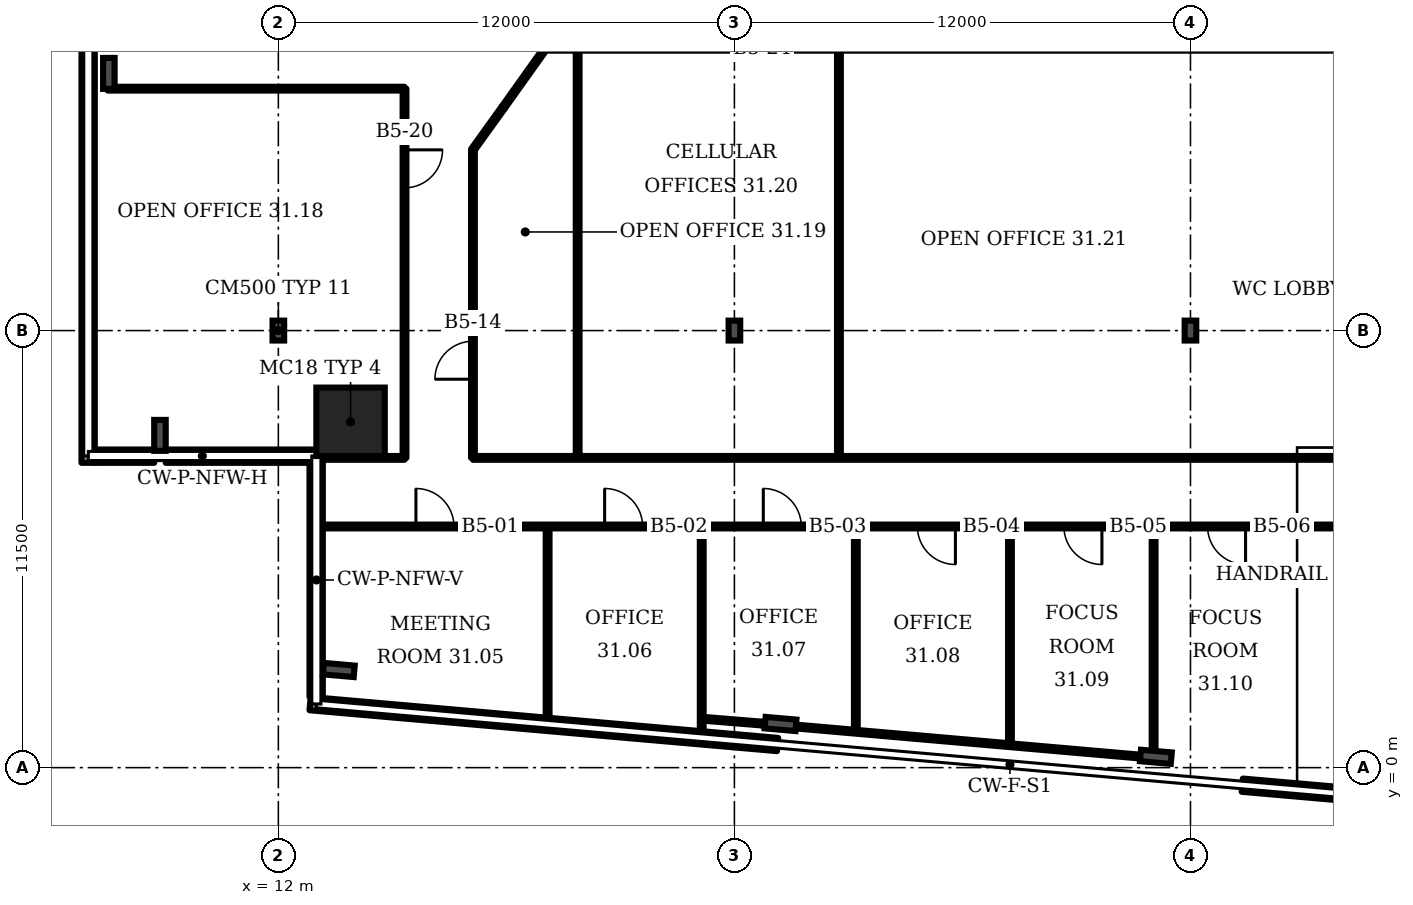
"""IFC4 building model, lengths in metres.
Left out: names, types, materials, properties, quantities, classifications, styles, units other than length and angle.
Written with IfcOpenShell. Run it as: python <this file> out.ifc"""

import sys

from ifc_helpers import new_model, si_unit, direction, frame, frame_2d, origin, origin_2d, place, context, subcontext, project, spatial, rectangle, i_section, extrude, element, fill, save


model = new_model("IFC4")
c1 = context("Model", 3, precision=1e-05, world=origin(), true_north=direction((0.0, 1.0)))
c2 = subcontext(c1, "Body", "Model", "MODEL_VIEW")
j1 = project(units=[si_unit("LENGTHUNIT", "METRE"), si_unit("PLANEANGLEUNIT", "RADIAN")], contexts=[c1])
p1 = place(None, origin())
s1 = spatial("IfcSite", under=j1, at=p1, CompositionType="ELEMENT")
p2 = place(p1, origin())
s2 = spatial("IfcBuilding", under=s1, at=p2, CompositionType="ELEMENT")
p3 = place(p2, frame((0.0, 0.0, 132.7)))
s3 = spatial("IfcBuildingStorey", under=s2, at=p3, CompositionType="ELEMENT", Elevation=132.7)
p4 = place(p3, frame((13.9, 9.1, 0.0), z_axis=(0.0, 0.0, 1.0), x_axis=(1.0, 0.0, 0.0)))
e1 = element("IfcColumn", 1, at=p4, inside=s3, PredefinedType="COLUMN", context=c2, shape_type="SweptSolid", body=[
    extrude(rectangle(XDim=1.8, YDim=1.8, at=origin_2d()), origin(), (0.0, 0.0, 1.0), 3.6),
])
for number, where, z_axis, x_axis in (
    (2, (13.591, 2.569, 0.0), (0.0, 0.0, 1.0), (-0.087, -0.996, 0.0)),
    (3, (25.214, 1.149, 0.0), (0.0, 0.0, 1.0), (-0.087, -0.996, 0.0)),
    (4, (35.089, 0.285, 0.0), (0.0, 0.0, 1.0), (-0.087, -0.996, 0.0)),
    (5, (7.54, 18.267, 0.0), (0.0, 0.0, 1.0), (-1.0, 0.0, 0.0)),
    (6, (8.885, 8.743, 0.0), (0.0, 0.0, 1.0), (-1.0, 0.0, 0.0)),
):
    element("IfcColumn", number, at=place(p3, frame(where, z_axis=z_axis, x_axis=x_axis)), inside=s3, PredefinedType="COLUMN", context=c2, shape_type="SweptSolid", body=[
        extrude(i_section(OverallWidth=0.303, OverallDepth=0.814, WebThickness=0.021, FlangeThickness=0.04, FilletRadius=0.03, at=origin_2d()), origin(), (0.0, 0.0, 1.0), 3.6),
    ])
for number, where, z_axis, x_axis in (
    (7, (12.0, 11.5, 0.0), (0.0, 0.0, 1.0), (1.0, 0.0, 0.0)),
    (8, (24.0, 11.5, 0.0), (0.0, 0.0, 1.0), (1.0, 0.0, 0.0)),
    (9, (36.0, 11.5, 0.0), (0.0, 0.0, 1.0), (1.0, 0.0, 0.0)),
):
    element("IfcColumn", number, at=place(p3, frame(where, z_axis=z_axis, x_axis=x_axis)), inside=s3, PredefinedType="COLUMN", context=c2, shape_type="SweptSolid", body=[
        extrude(i_section(OverallWidth=0.306, OverallDepth=0.524, WebThickness=0.021, FlangeThickness=0.04, FilletRadius=0.027, at=origin_2d()), origin(), (0.0, 0.0, 1.0), 3.6),
    ])
p5 = place(p3, frame((12.835, 1.685, 0.0), z_axis=(0.0, 0.0, 1.0), x_axis=(0.996192, -0.087173, 0.0)))
e10 = element("IfcWall", 10, at=p5, inside=s3, PredefinedType="SOLIDWALL", context=c2, shape_type="SweptSolid", body=[
    extrude(rectangle(XDim=12.348, YDim=0.35, at=frame_2d((6.174, 0.0))), origin(), (0.0, 0.0, 1.0), 1.0),
])
p6 = place(p3, frame((37.363, -0.461, 0.0), z_axis=(0.0, 0.0, 1.0), x_axis=(0.996194, -0.087159, 0.0)))
e11 = element("IfcWall", 11, at=p6, inside=s3, PredefinedType="SOLIDWALL", context=c2, shape_type="SweptSolid", body=[
    extrude(rectangle(XDim=12.199, YDim=0.35, at=frame_2d((6.099, 0.0))), origin(), (0.0, 0.0, 1.0), 1.0),
])
p7 = place(p3, frame((6.995, 19.437, 0.0), z_axis=(0.0, 0.0, 1.0), x_axis=(0.0, -1.0, 0.0)))
e12 = element("IfcWall", 12, at=p7, inside=s3, PredefinedType="SOLIDWALL", context=c2, shape_type="SweptSolid", body=[
    extrude(rectangle(XDim=11.417, YDim=0.35, at=frame_2d((5.708, 0.0))), origin(), (0.0, 0.0, 1.0), 1.0),
])
p8 = place(p3, frame((7.17, 8.195, 0.0), z_axis=(0.0, 0.0, 1.0), x_axis=(1.0, 0.0, 0.0)))
e13 = element("IfcWall", 13, at=p8, inside=s3, PredefinedType="SOLIDWALL", context=c2, shape_type="SweptSolid", body=[
    extrude(rectangle(XDim=1.563, YDim=0.35, at=frame_2d((0.782, 0.0))), origin(), (0.0, 0.0, 1.0), 1.0),
])
p9 = place(p3, frame((9.036, 8.195, 0.0), z_axis=(0.0, 0.0, 1.0), x_axis=(1.0, 0.0, 0.0)))
e14 = element("IfcWall", 14, at=p9, inside=s3, PredefinedType="SOLIDWALL", context=c2, shape_type="SweptSolid", body=[
    extrude(rectangle(XDim=3.964, YDim=0.35, at=frame_2d((1.982, 0.0))), origin(), (0.0, 0.0, 1.0), 1.0),
])
p10 = place(p3, frame((12.995, 8.02, 0.0), z_axis=(0.0, 0.0, 1.0), x_axis=(0.0, -1.0, 0.0)))
e15 = element("IfcWall", 15, at=p10, inside=s3, PredefinedType="SOLIDWALL", context=c2, shape_type="SweptSolid", body=[
    extrude(rectangle(XDim=6.161, YDim=0.35, at=frame_2d((3.081, 0.0))), origin(), (0.0, 0.0, 1.0), 1.0),
])
p11 = place(p3, frame((7.51, 17.865, 0.0), z_axis=(0.0, 0.0, 1.0), x_axis=(1.0, 0.0, 0.0)))
e16 = element("IfcWall", 16, at=p11, inside=s3, PredefinedType="PARTITIONING", context=c2, shape_type="SweptSolid", body=[
    extrude(rectangle(XDim=7.81, YDim=0.1, at=frame_2d((3.905, 0.0))), origin(), (0.0, 0.0, 1.0), 3.2),
])
p12 = place(p3, frame((13.02, 6.345, 0.0), z_axis=(0.0, 0.0, 1.0), x_axis=(1.0, 0.0, 0.0)))
e17 = element("IfcWall", 17, at=p12, inside=s3, PredefinedType="PARTITIONING", context=c2, shape_type="SweptSolid", body=[
    extrude(rectangle(XDim=28.165, YDim=0.1, at=frame_2d((14.083, 0.0))), origin(), (0.0, 0.0, 1.0), 3.2),
])
p13 = place(p12, frame((2.6, 0.0, 0.0)))
e18 = element("IfcOpeningElement", 18, at=p13, cuts=e17, PredefinedType="OPENING", context=c2, shape_type="SweptSolid", body=[
    extrude(rectangle(XDim=1.0, YDim=2.1, at=frame_2d((0.5, 1.05))), frame((0.0, 0.06, 0.0), z_axis=(0.0, -1.0, 0.0), x_axis=(1.0, 0.0, 0.0)), (0.0, 0.0, 1.0), 0.12),
])
p14 = place(p12, frame((7.565, 0.0, 0.0)))
e19 = element("IfcOpeningElement", 19, at=p14, cuts=e17, PredefinedType="OPENING", context=c2, shape_type="SweptSolid", body=[
    extrude(rectangle(XDim=1.0, YDim=2.1, at=frame_2d((0.5, 1.05))), frame((0.0, 0.06, 0.0), z_axis=(0.0, -1.0, 0.0), x_axis=(1.0, 0.0, 0.0)), (0.0, 0.0, 1.0), 0.12),
])
p15 = place(p12, frame((11.74, 0.0, 0.0)))
e20 = element("IfcOpeningElement", 20, at=p15, cuts=e17, PredefinedType="OPENING", context=c2, shape_type="SweptSolid", body=[
    extrude(rectangle(XDim=1.0, YDim=2.1, at=frame_2d((0.5, 1.05))), frame((0.0, 0.06, 0.0), z_axis=(0.0, -1.0, 0.0), x_axis=(1.0, 0.0, 0.0)), (0.0, 0.0, 1.0), 0.12),
])
p16 = place(p12, frame((15.795, 0.0, 0.0)))
e21 = element("IfcOpeningElement", 21, at=p16, cuts=e17, PredefinedType="OPENING", context=c2, shape_type="SweptSolid", body=[
    extrude(rectangle(XDim=1.0, YDim=2.1, at=frame_2d((0.5, 1.05))), frame((0.0, 0.06, 0.0), z_axis=(0.0, -1.0, 0.0), x_axis=(1.0, 0.0, 0.0)), (0.0, 0.0, 1.0), 0.12),
])
p17 = place(p12, frame((19.65, 0.0, 0.0)))
e22 = element("IfcOpeningElement", 22, at=p17, cuts=e17, PredefinedType="OPENING", context=c2, shape_type="SweptSolid", body=[
    extrude(rectangle(XDim=1.0, YDim=2.1, at=frame_2d((0.5, 1.05))), frame((0.0, 0.06, 0.0), z_axis=(0.0, -1.0, 0.0), x_axis=(1.0, 0.0, 0.0)), (0.0, 0.0, 1.0), 0.12),
])
p18 = place(p12, frame((23.43, 0.0, 0.0)))
e23 = element("IfcOpeningElement", 23, at=p18, cuts=e17, PredefinedType="OPENING", context=c2, shape_type="SweptSolid", body=[
    extrude(rectangle(XDim=1.0, YDim=2.1, at=frame_2d((0.5, 1.05))), frame((0.0, 0.06, 0.0), z_axis=(0.0, -1.0, 0.0), x_axis=(1.0, 0.0, 0.0)), (0.0, 0.0, 1.0), 0.12),
])
p19 = place(p3, frame((13.02, 8.15, 0.0), z_axis=(0.0, 0.0, 1.0), x_axis=(1.0, 0.0, 0.0)))
e24 = element("IfcWall", 24, at=p19, inside=s3, PredefinedType="PARTITIONING", context=c2, shape_type="SweptSolid", body=[
    extrude(rectangle(XDim=2.3, YDim=0.1, at=frame_2d((1.15, 0.0))), origin(), (0.0, 0.0, 1.0), 3.2),
])
p20 = place(p3, frame((15.32, 8.15, 0.0), z_axis=(0.0, 0.0, 1.0), x_axis=(0.0, 1.0, 0.0)))
e25 = element("IfcWall", 25, at=p20, inside=s3, PredefinedType="PARTITIONING", context=c2, shape_type="SweptSolid", body=[
    extrude(rectangle(XDim=9.715, YDim=0.1, at=frame_2d((4.857, 0.0))), origin(), (0.0, 0.0, 1.0), 3.2),
])
p21 = place(p20, frame((7.105, 0.0, 0.0)))
e26 = element("IfcOpeningElement", 26, at=p21, cuts=e25, PredefinedType="OPENING", context=c2, shape_type="SweptSolid", body=[
    extrude(rectangle(XDim=1.0, YDim=2.1, at=frame_2d((0.5, 1.05))), frame((0.0, 0.06, 0.0), z_axis=(0.0, -1.0, 0.0), x_axis=(1.0, 0.0, 0.0)), (0.0, 0.0, 1.0), 0.12),
])
p22 = place(p3, frame((17.12, 8.15, 0.0), z_axis=(0.0, 0.0, 1.0), x_axis=(0.0, 1.0, 0.0)))
e27 = element("IfcWall", 27, at=p22, inside=s3, PredefinedType="PARTITIONING", context=c2, shape_type="SweptSolid", body=[
    extrude(rectangle(XDim=8.11, YDim=0.1, at=frame_2d((4.055, 0.0))), origin(), (0.0, 0.0, 1.0), 3.2),
])
p23 = place(p22, frame((2.07, 0.0, 0.0)))
e28 = element("IfcOpeningElement", 28, at=p23, cuts=e27, PredefinedType="OPENING", context=c2, shape_type="SweptSolid", body=[
    extrude(rectangle(XDim=1.0, YDim=2.1, at=frame_2d((0.5, 1.05))), frame((0.0, 0.06, 0.0), z_axis=(0.0, -1.0, 0.0), x_axis=(1.0, 0.0, 0.0)), (0.0, 0.0, 1.0), 0.12),
])
p24 = place(p3, frame((17.12, 8.15, 0.0), z_axis=(0.0, 0.0, 1.0), x_axis=(1.0, 0.0, 0.0)))
e29 = element("IfcWall", 29, at=p24, inside=s3, PredefinedType="PARTITIONING", context=c2, shape_type="SweptSolid", body=[
    extrude(rectangle(XDim=24.065, YDim=0.1, at=frame_2d((12.033, 0.0))), origin(), (0.0, 0.0, 1.0), 3.2),
])
p25 = place(p3, frame((17.12, 16.26, 0.0), z_axis=(0.0, 0.0, 1.0), x_axis=(0.583811, 0.811893, 0.0)))
e30 = element("IfcWall", 30, at=p25, inside=s3, PredefinedType="PARTITIONING", context=c2, shape_type="SweptSolid", body=[
    extrude(rectangle(XDim=1.364, YDim=0.1, at=frame_2d((0.682, 0.0))), origin(), (0.0, 0.0, 1.0), 3.2),
])
p26 = place(p3, frame((17.915, 17.365, 0.0), z_axis=(0.0, 0.0, 1.0), x_axis=(0.580403, 0.814333, 0.0)))
e31 = element("IfcWall", 31, at=p26, inside=s3, PredefinedType="PARTITIONING", context=c2, shape_type="SweptSolid", body=[
    extrude(rectangle(XDim=1.905, YDim=0.1, at=frame_2d((0.952, 0.0))), origin(), (0.0, 0.0, 1.0), 3.2),
])
p27 = place(p3, frame((19.085, 1.163, 0.0), z_axis=(0.0, 0.0, 1.0), x_axis=(0.0, 1.0, 0.0)))
e32 = element("IfcWall", 32, at=p27, inside=s3, PredefinedType="PARTITIONING", context=c2, shape_type="SweptSolid", body=[
    extrude(rectangle(XDim=5.182, YDim=0.1, at=frame_2d((2.591, 0.0))), origin(), (0.0, 0.0, 1.0), 2.58),
])
p28 = place(p3, frame((19.875, 8.15, 0.0), z_axis=(0.0, 0.0, 1.0), x_axis=(0.0, 1.0, 0.0)))
e33 = element("IfcWall", 33, at=p28, inside=s3, PredefinedType="PARTITIONING", context=c2, shape_type="SweptSolid", body=[
    extrude(rectangle(XDim=10.765, YDim=0.1, at=frame_2d((5.383, 0.0))), origin(), (0.0, 0.0, 1.0), 3.2),
])
p29 = place(p3, frame((23.14, 0.825, 0.0), z_axis=(0.0, 0.0, 1.0), x_axis=(0.0, 1.0, 0.0)))
e34 = element("IfcWall", 34, at=p29, inside=s3, PredefinedType="PARTITIONING", context=c2, shape_type="SweptSolid", body=[
    extrude(rectangle(XDim=5.52, YDim=0.1, at=frame_2d((2.76, 0.0))), origin(), (0.0, 0.0, 1.0), 2.58),
])
p30 = place(p3, frame((24.715, 1.16, 0.0), z_axis=(0.0, 0.0, 1.0), x_axis=(-0.996654, 0.081685, 0.0)))
e35 = element("IfcWall", 35, at=p30, inside=s3, PredefinedType="PARTITIONING", context=c2, shape_type="SweptSolid", body=[
    extrude(rectangle(XDim=1.53, YDim=0.1, at=frame_2d((0.765, 0.0))), origin(), (0.0, 0.0, 1.0), 2.58),
])
p31 = place(p3, frame((26.75, 8.15, 0.0), z_axis=(0.0, 0.0, 1.0), x_axis=(0.0, 1.0, 0.0)))
e36 = element("IfcWall", 36, at=p31, inside=s3, PredefinedType="PARTITIONING", context=c2, shape_type="SweptSolid", body=[
    extrude(rectangle(XDim=10.765, YDim=0.1, at=frame_2d((5.383, 0.0))), origin(), (0.0, 0.0, 1.0), 3.2),
])
p32 = place(p3, frame((27.195, 0.945, 0.0), z_axis=(0.0, 0.0, 1.0), x_axis=(0.0, 1.0, 0.0)))
e37 = element("IfcWall", 37, at=p32, inside=s3, PredefinedType="PARTITIONING", context=c2, shape_type="SweptSolid", body=[
    extrude(rectangle(XDim=5.4, YDim=0.1, at=frame_2d((2.7, 0.0))), origin(), (0.0, 0.0, 1.0), 3.2),
])
p33 = place(p3, frame((31.25, 0.59, 0.0), z_axis=(0.0, 0.0, 1.0), x_axis=(0.0, 1.0, 0.0)))
e38 = element("IfcWall", 38, at=p33, inside=s3, PredefinedType="PARTITIONING", context=c2, shape_type="SweptSolid", body=[
    extrude(rectangle(XDim=5.755, YDim=0.1, at=frame_2d((2.877, 0.0))), origin(), (0.0, 0.0, 1.0), 3.2),
])
p34 = place(p3, frame((35.03, 0.26, 0.0), z_axis=(0.0, 0.0, 1.0), x_axis=(0.0, 1.0, 0.0)))
e39 = element("IfcWall", 39, at=p34, inside=s3, PredefinedType="PARTITIONING", context=c2, shape_type="SweptSolid", body=[
    extrude(rectangle(XDim=6.085, YDim=0.1, at=frame_2d((3.042, 0.0))), origin(), (0.0, 0.0, 1.0), 3.2),
])
p35 = place(p3, frame((35.03, 0.26, 0.0), z_axis=(0.0, 0.0, 1.0), x_axis=(-0.996214, 0.086976, 0.0)))
e40 = element("IfcWall", 40, at=p35, inside=s3, PredefinedType="PARTITIONING", context=c2, shape_type="SweptSolid", body=[
    extrude(rectangle(XDim=10.352, YDim=0.1, at=frame_2d((5.176, 0.0))), origin(), (0.0, 0.0, 1.0), 2.58),
])
p36 = place(p13, origin())
e41 = element("IfcDoor", 41, at=p36, inside=s3, OperationType="SINGLE_SWING_LEFT", PredefinedType="DOOR", context=c2, shape_type="SweptSolid", body=[
    extrude(rectangle(XDim=1.0, YDim=2.1, at=frame_2d((0.5, 1.05))), frame((0.0, 0.025, 0.0), z_axis=(0.0, -1.0, 0.0), x_axis=(1.0, 0.0, 0.0)), (0.0, 0.0, 1.0), 0.05),
])
fill(e18, e41)
p37 = place(p14, origin())
e42 = element("IfcDoor", 42, at=p37, inside=s3, OperationType="SINGLE_SWING_LEFT", PredefinedType="DOOR", context=c2, shape_type="SweptSolid", body=[
    extrude(rectangle(XDim=1.0, YDim=2.1, at=frame_2d((0.5, 1.05))), frame((0.0, 0.025, 0.0), z_axis=(0.0, -1.0, 0.0), x_axis=(1.0, 0.0, 0.0)), (0.0, 0.0, 1.0), 0.05),
])
fill(e19, e42)
p38 = place(p15, origin())
e43 = element("IfcDoor", 43, at=p38, inside=s3, OperationType="SINGLE_SWING_LEFT", PredefinedType="DOOR", context=c2, shape_type="SweptSolid", body=[
    extrude(rectangle(XDim=1.0, YDim=2.1, at=frame_2d((0.5, 1.05))), frame((0.0, 0.025, 0.0), z_axis=(0.0, -1.0, 0.0), x_axis=(1.0, 0.0, 0.0)), (0.0, 0.0, 1.0), 0.05),
])
fill(e20, e43)
p39 = place(p16, origin())
e44 = element("IfcDoor", 44, at=p39, inside=s3, OperationType="SINGLE_SWING_RIGHT", PredefinedType="DOOR", context=c2, shape_type="SweptSolid", body=[
    extrude(rectangle(XDim=1.0, YDim=2.1, at=frame_2d((0.5, 1.05))), frame((0.0, 0.025, 0.0), z_axis=(0.0, -1.0, 0.0), x_axis=(1.0, 0.0, 0.0)), (0.0, 0.0, 1.0), 0.05),
])
fill(e21, e44)
p40 = place(p17, origin())
e45 = element("IfcDoor", 45, at=p40, inside=s3, OperationType="SINGLE_SWING_RIGHT", PredefinedType="DOOR", context=c2, shape_type="SweptSolid", body=[
    extrude(rectangle(XDim=1.0, YDim=2.1, at=frame_2d((0.5, 1.05))), frame((0.0, 0.025, 0.0), z_axis=(0.0, -1.0, 0.0), x_axis=(1.0, 0.0, 0.0)), (0.0, 0.0, 1.0), 0.05),
])
fill(e22, e45)
p41 = place(p18, origin())
e46 = element("IfcDoor", 46, at=p41, inside=s3, OperationType="SINGLE_SWING_RIGHT", PredefinedType="DOOR", context=c2, shape_type="SweptSolid", body=[
    extrude(rectangle(XDim=1.0, YDim=2.1, at=frame_2d((0.5, 1.05))), frame((0.0, 0.025, 0.0), z_axis=(0.0, -1.0, 0.0), x_axis=(1.0, 0.0, 0.0)), (0.0, 0.0, 1.0), 0.05),
])
fill(e23, e46)
p42 = place(p23, origin())
e47 = element("IfcDoor", 47, at=p42, inside=s3, OperationType="SINGLE_SWING_LEFT", PredefinedType="DOOR", context=c2, shape_type="SweptSolid", body=[
    extrude(rectangle(XDim=1.0, YDim=2.1, at=frame_2d((0.5, 1.05))), frame((0.0, 0.025, 0.0), z_axis=(0.0, -1.0, 0.0), x_axis=(1.0, 0.0, 0.0)), (0.0, 0.0, 1.0), 0.05),
])
fill(e28, e47)
p43 = place(p21, origin())
e48 = element("IfcDoor", 48, at=p43, inside=s3, OperationType="SINGLE_SWING_RIGHT", PredefinedType="DOOR", context=c2, shape_type="SweptSolid", body=[
    extrude(rectangle(XDim=1.0, YDim=2.1, at=frame_2d((0.5, 1.05))), frame((0.0, 0.025, 0.0), z_axis=(0.0, -1.0, 0.0), x_axis=(1.0, 0.0, 0.0)), (0.0, 0.0, 1.0), 0.05),
])
fill(e26, e48)
save(model, sys.argv[1])
